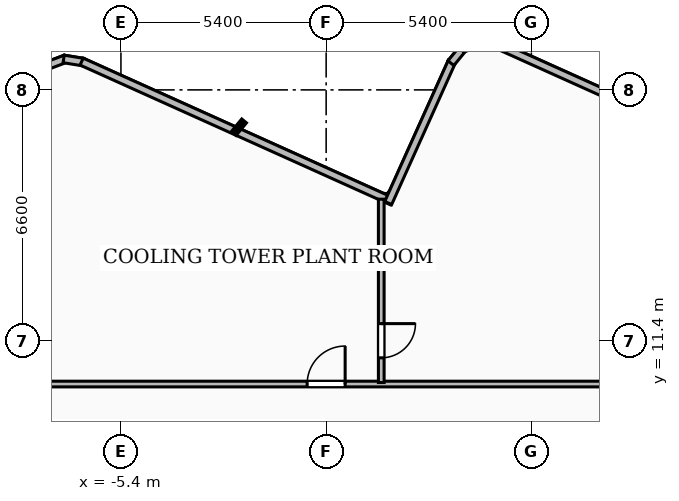
"""IFC4 building model, lengths in metres.
Left out: names, types, materials, properties, quantities, classifications, styles, units other than length and angle.
Written with IfcOpenShell. Run it as: python <this file> out.ifc"""

import sys

from ifc_helpers import new_model, si_unit, direction, frame, frame_2d, origin, place, context, subcontext, project, spatial, rectangle, extrude, element, fill, save


model = new_model("IFC4")
c1 = context("Model", 3, precision=1e-05, world=origin(), true_north=direction((0.0, 1.0)))
c2 = subcontext(c1, "Body", "Model", "MODEL_VIEW")
j1 = project(units=[si_unit("LENGTHUNIT", "METRE"), si_unit("PLANEANGLEUNIT", "RADIAN")], contexts=[c1])
p1 = place(None, origin())
s1 = spatial("IfcSite", under=j1, at=p1, CompositionType="ELEMENT")
p2 = place(p1, origin())
s2 = spatial("IfcBuilding", under=s1, at=p2, CompositionType="ELEMENT")
p3 = place(p2, frame((0.0, 0.0, 297.54)))
s3 = spatial("IfcBuildingStorey", under=s2, at=p3, CompositionType="ELEMENT", Elevation=297.54)
p4 = place(p3, frame((-7.339, 18.637, 0.0), z_axis=(0.0, 0.0, 1.0), x_axis=(0.935013831521, 0.354611244695, 0.0)))
e1 = element("IfcWall", 1, at=p4, inside=s3, PredefinedType="SOLIDWALL", context=c2, shape_type="SweptSolid", body=[
    extrude(rectangle(XDim=0.514, YDim=0.2, at=frame_2d((0.257, 0.0))), origin(), (0.0, 0.0, 1.0), 3.84),
])
p5 = place(p3, frame((-6.907, 18.814, 0.0), z_axis=(0.0, 0.0, 1.0), x_axis=(0.987255192858, -0.159145166984, 0.0)))
e2 = element("IfcWall", 2, at=p5, inside=s3, PredefinedType="SOLIDWALL", context=c2, shape_type="SweptSolid", body=[
    extrude(rectangle(XDim=0.528, YDim=0.2, at=frame_2d((0.264, 0.0))), origin(), (0.0, 0.0, 1.0), 3.84),
])
p6 = place(p3, frame((-6.434, 18.744, 0.0), z_axis=(0.0, 0.0, 1.0), x_axis=(0.911836374838, -0.410553803445, 0.0)))
e3 = element("IfcWall", 3, at=p6, inside=s3, PredefinedType="SOLIDWALL", context=c2, shape_type="SweptSolid", body=[
    extrude(rectangle(XDim=8.963, YDim=0.2, at=frame_2d((4.482, 0.0))), origin(), (0.0, 0.0, 1.0), 3.84),
])
p7 = place(p3, frame((1.633, 15.024, 0.0), z_axis=(0.0, 0.0, 1.0), x_axis=(0.410578530723, 0.911825240991, 0.0)))
e4 = element("IfcWall", 4, at=p7, inside=s3, PredefinedType="SOLIDWALL", context=c2, shape_type="SweptSolid", body=[
    extrude(rectangle(XDim=4.082, YDim=0.2, at=frame_2d((2.041, 0.0))), origin(), (0.0, 0.0, 1.0), 3.84),
])
p8 = place(p3, frame((3.283, 18.704, 0.0), z_axis=(0.0, 0.0, 1.0), x_axis=(0.63346470779, 0.773771583857, 0.0)))
e5 = element("IfcWall", 5, at=p8, inside=s3, PredefinedType="SOLIDWALL", context=c2, shape_type="SweptSolid", body=[
    extrude(rectangle(XDim=0.527, YDim=0.2, at=frame_2d((0.264, 0.0))), origin(), (0.0, 0.0, 1.0), 3.84),
])
p9 = place(p3, frame((3.578, 19.084, 0.0), z_axis=(0.0, 0.0, 1.0), x_axis=(0.934382341008, 0.356271863628, 0.0)))
e6 = element("IfcWall", 6, at=p9, inside=s3, PredefinedType="SOLIDWALL", context=c2, shape_type="SweptSolid", body=[
    extrude(rectangle(XDim=0.514, YDim=0.2, at=frame_2d((0.257, 0.0))), origin(), (0.0, 0.0, 1.0), 3.84),
])
p10 = place(p3, frame((4.483, 19.191, 0.0), z_axis=(0.0, 0.0, 1.0), x_axis=(0.911897403985, -0.410418231327, 0.0)))
e7 = element("IfcWall", 7, at=p10, inside=s3, PredefinedType="SOLIDWALL", context=c2, shape_type="SweptSolid", body=[
    extrude(rectangle(XDim=7.582, YDim=0.2, at=frame_2d((3.791, 0.0))), origin(), (0.0, 0.0, 1.0), 3.84),
])
p11 = place(p3, frame((-11.194, 10.26, 0.0), z_axis=(0.0, 0.0, 1.0), x_axis=(1.0, 0.0, 0.0)))
e8 = element("IfcWall", 8, at=p11, inside=s3, PredefinedType="PARTITIONING", context=c2, shape_type="SweptSolid", body=[
    extrude(rectangle(XDim=23.445, YDim=0.15, at=frame_2d((11.723, 0.0))), origin(), (0.0, 0.0, 1.0), 3.21),
])
p12 = place(p11, frame((10.694, 0.0, 0.0)))
e9 = element("IfcOpeningElement", 9, at=p12, cuts=e8, PredefinedType="OPENING", context=c2, shape_type="SweptSolid", body=[
    extrude(rectangle(XDim=1.0, YDim=2.1, at=frame_2d((0.5, 1.05))), frame((0.0, 0.085, 0.0), z_axis=(0.0, -1.0, 0.0), x_axis=(1.0, 0.0, 0.0)), (0.0, 0.0, 1.0), 0.17),
])
p13 = place(p3, frame((1.45, 15.124, 0.0), z_axis=(0.0, 0.0, 1.0), x_axis=(0.0, -1.0, 0.0)))
e10 = element("IfcWall", 10, at=p13, inside=s3, PredefinedType="PARTITIONING", context=c2, shape_type="SweptSolid", body=[
    extrude(rectangle(XDim=4.824, YDim=0.15, at=frame_2d((2.412, 0.0))), origin(), (0.0, 0.0, 1.0), 3.84),
])
p14 = place(p13, frame((3.274, 0.0, 0.0)))
e11 = element("IfcOpeningElement", 11, at=p14, cuts=e10, PredefinedType="OPENING", context=c2, shape_type="SweptSolid", body=[
    extrude(rectangle(XDim=0.9, YDim=2.06, at=frame_2d((0.45, 1.03))), frame((0.0, 0.085, 0.0), z_axis=(0.0, -1.0, 0.0), x_axis=(1.0, 0.0, 0.0)), (0.0, 0.0, 1.0), 0.17),
])
p15 = place(p12, origin())
e12 = element("IfcDoor", 12, at=p15, inside=s3, OperationType="SINGLE_SWING_RIGHT", PredefinedType="DOOR", context=c2, shape_type="SweptSolid", body=[
    extrude(rectangle(XDim=1.0, YDim=2.1, at=frame_2d((0.5, 1.05))), frame((0.0, 0.025, 0.0), z_axis=(0.0, -1.0, 0.0), x_axis=(1.0, 0.0, 0.0)), (0.0, 0.0, 1.0), 0.05),
])
fill(e9, e12)
p16 = place(p14, origin())
e13 = element("IfcDoor", 13, at=p16, inside=s3, OperationType="SINGLE_SWING_LEFT", PredefinedType="DOOR", context=c2, shape_type="SweptSolid", body=[
    extrude(rectangle(XDim=0.9, YDim=2.06, at=frame_2d((0.45, 1.03))), frame((0.0, 0.025, 0.0), z_axis=(0.0, -1.0, 0.0), x_axis=(1.0, 0.0, 0.0)), (0.0, 0.0, 1.0), 0.05),
])
fill(e11, e13)
save(model, sys.argv[1])
